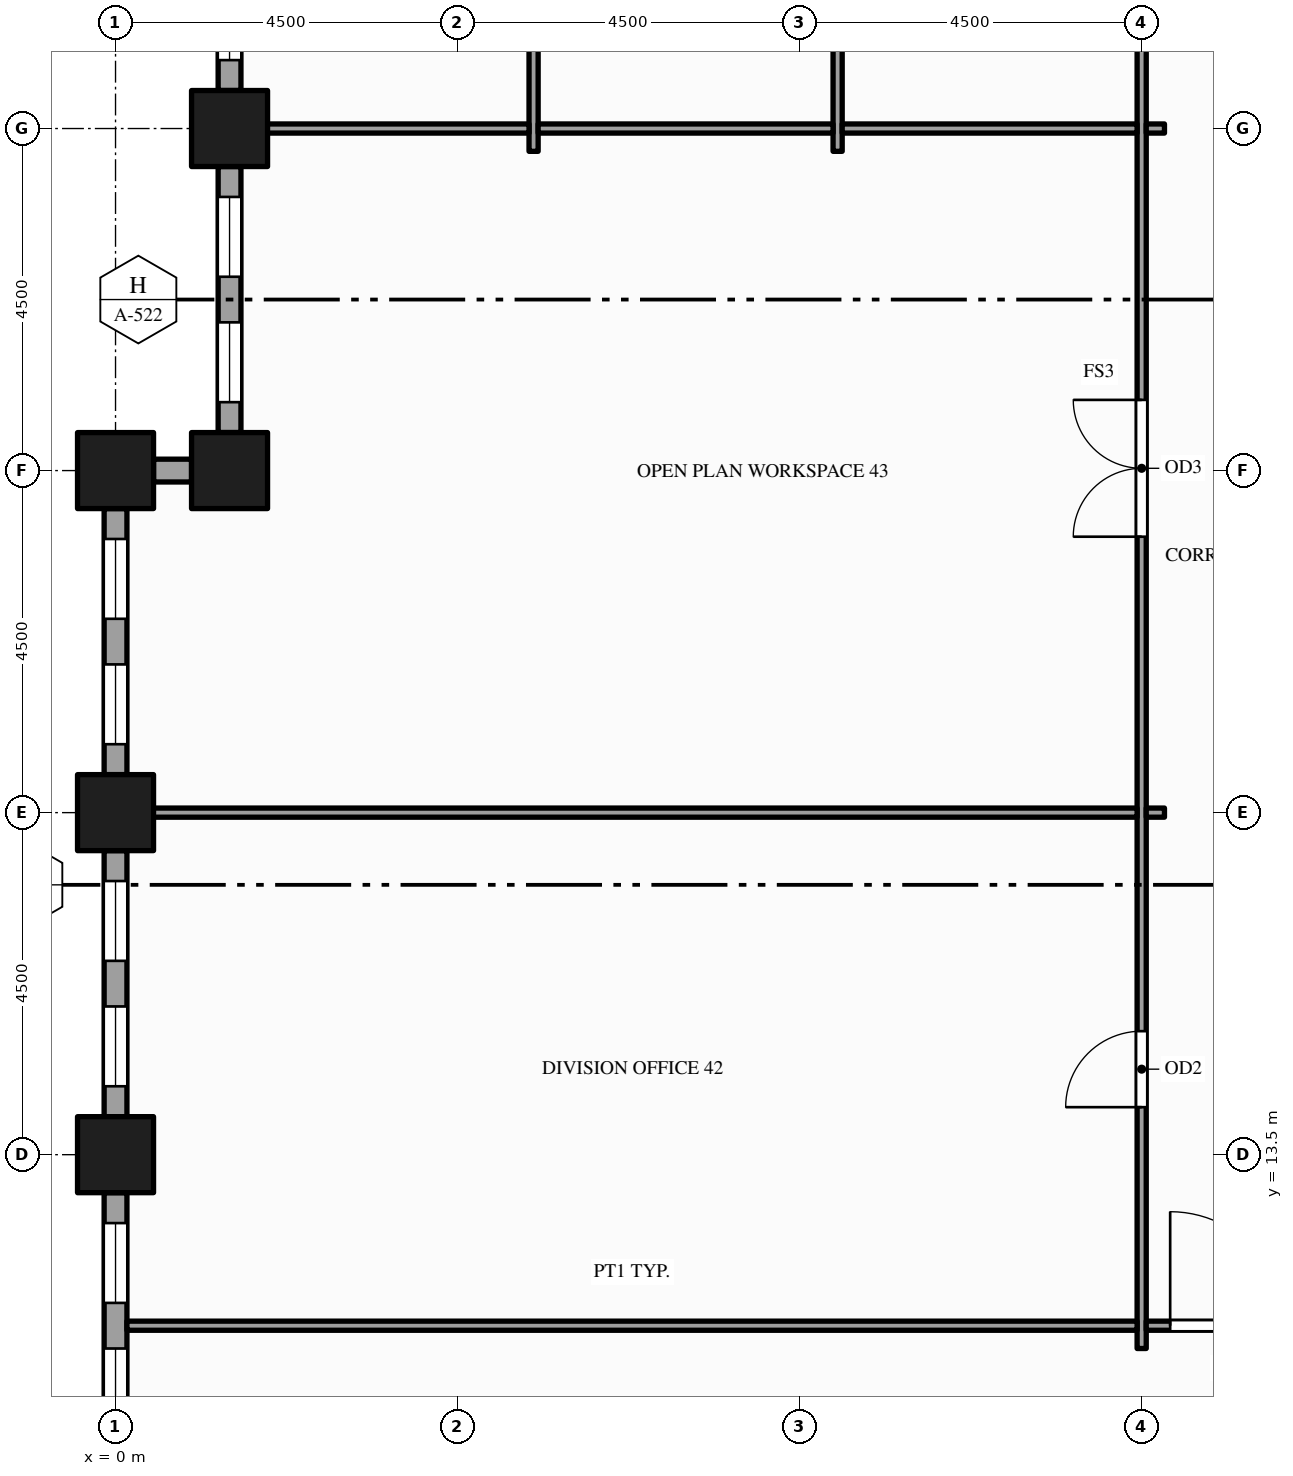
"""IFC4 building model, lengths in metres.
Left out: names, types, materials, properties, quantities, classifications, styles, units other than length and angle.
Written with IfcOpenShell. Run it as: python <this file> out.ifc"""

import sys

from ifc_helpers import new_model, si_unit, direction, frame, frame_2d, origin, origin_2d, place, context, subcontext, project, spatial, rectangle, hollow_rectangle, extrude, element, fill, save


model = new_model("IFC4")
c1 = context("Model", 3, precision=1e-05, world=origin(), true_north=direction((0.0, 1.0)))
c2 = subcontext(c1, "Body", "Model", "MODEL_VIEW")
j1 = project(units=[si_unit("LENGTHUNIT", "METRE"), si_unit("PLANEANGLEUNIT", "RADIAN")], contexts=[c1])
p1 = place(None, origin())
s1 = spatial("IfcSite", under=j1, at=p1, CompositionType="ELEMENT")
p2 = place(p1, origin())
s2 = spatial("IfcBuilding", under=s1, at=p2, CompositionType="ELEMENT")
p3 = place(p2, frame((0.0, 0.0, 115.0)))
s3 = spatial("IfcBuildingStorey", under=s2, at=p3, CompositionType="ELEMENT", Elevation=115.0)
for number, where, z_axis, x_axis in (
    (1, (0.0, 13.5, -0.15), (0.0, 0.0, 1.0), (1.0, 0.0, 0.0)),
    (2, (0.0, 18.0, -0.15), (0.0, 0.0, 1.0), (1.0, 0.0, 0.0)),
    (3, (0.0, 22.5, -0.15), (0.0, 0.0, 1.0), (1.0, 0.0, 0.0)),
    (4, (1.5, 22.5, -0.15), (0.0, 0.0, 1.0), (1.0, 0.0, 0.0)),
    (5, (1.5, 27.0, -0.15), (0.0, 0.0, 1.0), (1.0, 0.0, 0.0)),
):
    element("IfcColumn", number, at=place(p3, frame(where, z_axis=z_axis, x_axis=x_axis)), inside=s3, PredefinedType="COLUMN", context=c2, shape_type="SweptSolid", body=[
        extrude(hollow_rectangle(XDim=1.0, YDim=1.0, WallThickness=0.05, at=origin_2d()), origin(), (0.0, 0.0, 1.0), 4.0),
    ])
p4 = place(p3, frame((1.5, 31.0, 0.0), z_axis=(0.0, 0.0, 1.0), x_axis=(0.0, -1.0, 0.0)))
e6 = element("IfcWall", 6, at=p4, inside=s3, PredefinedType="STANDARD", context=c2, shape_type="SweptSolid", body=[
    extrude(rectangle(XDim=3.5, YDim=0.3, at=frame_2d((1.75, 0.0))), origin(), (0.0, 0.0, 1.0), 3.154),
])
p5 = place(p4, frame((0.4, 0.0, 0.9)))
e7 = element("IfcOpeningElement", 7, at=p5, cuts=e6, PredefinedType="OPENING", context=c2, shape_type="SweptSolid", body=[
    extrude(rectangle(XDim=1.05, YDim=2.0, at=frame_2d((0.525, 1.0))), frame((0.0, 0.16, 0.0), z_axis=(0.0, -1.0, 0.0), x_axis=(1.0, 0.0, 0.0)), (0.0, 0.0, 1.0), 0.32),
])
p6 = place(p4, frame((2.05, 0.0, 0.9)))
e8 = element("IfcOpeningElement", 8, at=p6, cuts=e6, PredefinedType="OPENING", context=c2, shape_type="SweptSolid", body=[
    extrude(rectangle(XDim=1.05, YDim=2.0, at=frame_2d((0.525, 1.0))), frame((0.0, 0.16, 0.0), z_axis=(0.0, -1.0, 0.0), x_axis=(1.0, 0.0, 0.0)), (0.0, 0.0, 1.0), 0.32),
])
p7 = place(p3, frame((1.5, 26.5, 0.0), z_axis=(0.0, 0.0, 1.0), x_axis=(0.0, -1.0, 0.0)))
e9 = element("IfcWall", 9, at=p7, inside=s3, PredefinedType="STANDARD", context=c2, shape_type="SweptSolid", body=[
    extrude(rectangle(XDim=3.5, YDim=0.3, at=frame_2d((1.75, 0.0))), origin(), (0.0, 0.0, 1.0), 3.154),
])
p8 = place(p7, frame((0.4, 0.0, 0.9)))
e10 = element("IfcOpeningElement", 10, at=p8, cuts=e9, PredefinedType="OPENING", context=c2, shape_type="SweptSolid", body=[
    extrude(rectangle(XDim=1.05, YDim=2.0, at=frame_2d((0.525, 1.0))), frame((0.0, 0.16, 0.0), z_axis=(0.0, -1.0, 0.0), x_axis=(1.0, 0.0, 0.0)), (0.0, 0.0, 1.0), 0.32),
])
p9 = place(p7, frame((2.05, 0.0, 0.9)))
e11 = element("IfcOpeningElement", 11, at=p9, cuts=e9, PredefinedType="OPENING", context=c2, shape_type="SweptSolid", body=[
    extrude(rectangle(XDim=1.05, YDim=2.0, at=frame_2d((0.525, 1.0))), frame((0.0, 0.16, 0.0), z_axis=(0.0, -1.0, 0.0), x_axis=(1.0, 0.0, 0.0)), (0.0, 0.0, 1.0), 0.32),
])
p10 = place(p3, frame((1.0, 22.5, 0.0), z_axis=(0.0, 0.0, 1.0), x_axis=(-1.0, 0.0, 0.0)))
e12 = element("IfcWall", 12, at=p10, inside=s3, PredefinedType="STANDARD", context=c2, shape_type="SweptSolid", body=[
    extrude(rectangle(XDim=0.5, YDim=0.3, at=frame_2d((0.25, 0.0))), origin(), (0.0, 0.0, 1.0), 3.154),
])
p11 = place(p3, frame((0.0, 22.0, 0.0), z_axis=(0.0, 0.0, 1.0), x_axis=(0.0, -1.0, 0.0)))
e13 = element("IfcWall", 13, at=p11, inside=s3, PredefinedType="STANDARD", context=c2, shape_type="SweptSolid", body=[
    extrude(rectangle(XDim=3.5, YDim=0.3, at=frame_2d((1.75, 0.0))), origin(), (0.0, 0.0, 1.0), 3.154),
])
p12 = place(p11, frame((0.4, 0.0, 0.9)))
e14 = element("IfcOpeningElement", 14, at=p12, cuts=e13, PredefinedType="OPENING", context=c2, shape_type="SweptSolid", body=[
    extrude(rectangle(XDim=1.05, YDim=2.0, at=frame_2d((0.525, 1.0))), frame((0.0, 0.16, 0.0), z_axis=(0.0, -1.0, 0.0), x_axis=(1.0, 0.0, 0.0)), (0.0, 0.0, 1.0), 0.32),
])
p13 = place(p11, frame((2.05, 0.0, 0.9)))
e15 = element("IfcOpeningElement", 15, at=p13, cuts=e13, PredefinedType="OPENING", context=c2, shape_type="SweptSolid", body=[
    extrude(rectangle(XDim=1.05, YDim=2.0, at=frame_2d((0.525, 1.0))), frame((0.0, 0.16, 0.0), z_axis=(0.0, -1.0, 0.0), x_axis=(1.0, 0.0, 0.0)), (0.0, 0.0, 1.0), 0.32),
])
p14 = place(p3, frame((0.0, 17.5, 0.0), z_axis=(0.0, 0.0, 1.0), x_axis=(0.0, -1.0, 0.0)))
e16 = element("IfcWall", 16, at=p14, inside=s3, PredefinedType="STANDARD", context=c2, shape_type="SweptSolid", body=[
    extrude(rectangle(XDim=3.5, YDim=0.3, at=frame_2d((1.75, 0.0))), origin(), (0.0, 0.0, 1.0), 3.154),
])
p15 = place(p14, frame((0.4, 0.0, 0.9)))
e17 = element("IfcOpeningElement", 17, at=p15, cuts=e16, PredefinedType="OPENING", context=c2, shape_type="SweptSolid", body=[
    extrude(rectangle(XDim=1.05, YDim=2.0, at=frame_2d((0.525, 1.0))), frame((0.0, 0.16, 0.0), z_axis=(0.0, -1.0, 0.0), x_axis=(1.0, 0.0, 0.0)), (0.0, 0.0, 1.0), 0.32),
])
p16 = place(p14, frame((2.05, 0.0, 0.9)))
e18 = element("IfcOpeningElement", 18, at=p16, cuts=e16, PredefinedType="OPENING", context=c2, shape_type="SweptSolid", body=[
    extrude(rectangle(XDim=1.05, YDim=2.0, at=frame_2d((0.525, 1.0))), frame((0.0, 0.16, 0.0), z_axis=(0.0, -1.0, 0.0), x_axis=(1.0, 0.0, 0.0)), (0.0, 0.0, 1.0), 0.32),
])
p17 = place(p3, frame((0.0, 13.0, 0.0), z_axis=(0.0, 0.0, 1.0), x_axis=(0.0, -1.0, 0.0)))
e19 = element("IfcWall", 19, at=p17, inside=s3, PredefinedType="STANDARD", context=c2, shape_type="SweptSolid", body=[
    extrude(rectangle(XDim=3.5, YDim=0.3, at=frame_2d((1.75, 0.0))), origin(), (0.0, 0.0, 1.0), 3.154),
])
p18 = place(p17, frame((0.4, 0.0, 0.9)))
e20 = element("IfcOpeningElement", 20, at=p18, cuts=e19, PredefinedType="OPENING", context=c2, shape_type="SweptSolid", body=[
    extrude(rectangle(XDim=1.05, YDim=2.0, at=frame_2d((0.525, 1.0))), frame((0.0, 0.16, 0.0), z_axis=(0.0, -1.0, 0.0), x_axis=(1.0, 0.0, 0.0)), (0.0, 0.0, 1.0), 0.32),
])
p19 = place(p17, frame((2.05, 0.0, 0.9)))
e21 = element("IfcOpeningElement", 21, at=p19, cuts=e19, PredefinedType="OPENING", context=c2, shape_type="SweptSolid", body=[
    extrude(rectangle(XDim=1.05, YDim=2.0, at=frame_2d((0.525, 1.0))), frame((0.0, 0.16, 0.0), z_axis=(0.0, -1.0, 0.0), x_axis=(1.0, 0.0, 0.0)), (0.0, 0.0, 1.0), 0.32),
])
for number, where, z_axis, x_axis in (
    (22, (5.5, 26.7, 0.0), (0.0, 0.0, 1.0), (0.0, 1.0, 0.0)),
    (23, (9.5, 26.7, 0.0), (0.0, 0.0, 1.0), (0.0, 1.0, 0.0)),
):
    element("IfcWall", number, at=place(p3, frame(where, z_axis=z_axis, x_axis=x_axis)), inside=s3, PredefinedType="PARTITIONING", context=c2, shape_type="SweptSolid", body=[
        extrude(rectangle(XDim=5.1, YDim=0.12, at=frame_2d((2.55, 0.0))), origin(), (0.0, 0.0, 1.0), 3.85),
    ])
p20 = place(p3, frame((13.5, 10.95, 0.0), z_axis=(0.0, 0.0, 1.0), x_axis=(0.0, 1.0, 0.0)))
e24 = element("IfcWall", 24, at=p20, inside=s3, PredefinedType="PARTITIONING", context=c2, shape_type="SweptSolid", body=[
    extrude(rectangle(XDim=20.85, YDim=0.12, at=frame_2d((10.425, 0.0))), origin(), (0.0, 0.0, 1.0), 2.6),
])
p21 = place(p20, frame((3.175, 0.0, 0.0)))
e25 = element("IfcOpeningElement", 25, at=p21, cuts=e24, PredefinedType="OPENING", context=c2, shape_type="SweptSolid", body=[
    extrude(rectangle(XDim=1.0, YDim=2.1, at=frame_2d((0.5, 1.05))), frame((0.0, 0.07, 0.0), z_axis=(0.0, -1.0, 0.0), x_axis=(1.0, 0.0, 0.0)), (0.0, 0.0, 1.0), 0.14),
])
p22 = place(p20, frame((10.68, 0.0, 0.0)))
e26 = element("IfcOpeningElement", 26, at=p22, cuts=e24, PredefinedType="OPENING", context=c2, shape_type="SweptSolid", body=[
    extrude(rectangle(XDim=1.8, YDim=2.1, at=frame_2d((0.9, 1.05))), frame((0.0, 0.07, 0.0), z_axis=(0.0, -1.0, 0.0), x_axis=(1.0, 0.0, 0.0)), (0.0, 0.0, 1.0), 0.14),
])
p23 = place(p3, frame((0.15, 11.25, 0.0), z_axis=(0.0, 0.0, 1.0), x_axis=(1.0, 0.0, 0.0)))
e27 = element("IfcWall", 27, at=p23, inside=s3, PredefinedType="PARTITIONING", context=c2, shape_type="SweptSolid", body=[
    extrude(rectangle(XDim=13.29, YDim=0.12, at=frame_2d((6.645, 0.0))), origin(), (0.0, 0.0, 1.0), 2.938),
])
p24 = place(p3, frame((13.56, 11.25, 0.0), z_axis=(0.0, 0.0, 1.0), x_axis=(1.0, 0.0, 0.0)))
e28 = element("IfcWall", 28, at=p24, inside=s3, PredefinedType="PARTITIONING", context=c2, shape_type="SweptSolid", body=[
    extrude(rectangle(XDim=2.13, YDim=0.12, at=frame_2d((1.065, 0.0))), origin(), (0.0, 0.0, 1.0), 2.938),
])
p25 = place(p24, frame((0.315, 0.0, 0.0)))
e29 = element("IfcOpeningElement", 29, at=p25, cuts=e28, PredefinedType="OPENING", context=c2, shape_type="SweptSolid", body=[
    extrude(rectangle(XDim=1.5, YDim=2.1, at=frame_2d((0.75, 1.05))), frame((0.0, 0.07, 0.0), z_axis=(0.0, -1.0, 0.0), x_axis=(1.0, 0.0, 0.0)), (0.0, 0.0, 1.0), 0.14),
])
p26 = place(p3, frame((0.15, 18.0, 0.0), z_axis=(0.0, 0.0, 1.0), x_axis=(1.0, 0.0, 0.0)))
e30 = element("IfcWall", 30, at=p26, inside=s3, PredefinedType="PARTITIONING", context=c2, shape_type="SweptSolid", body=[
    extrude(rectangle(XDim=13.29, YDim=0.12, at=frame_2d((6.645, 0.0))), origin(), (0.0, 0.0, 1.0), 2.938),
])
p27 = place(p3, frame((13.56, 18.0, 0.0), z_axis=(0.0, 0.0, 1.0), x_axis=(1.0, 0.0, 0.0)))
e31 = element("IfcWall", 31, at=p27, inside=s3, PredefinedType="PARTITIONING", context=c2, shape_type="SweptSolid", body=[
    extrude(rectangle(XDim=0.24, YDim=0.12, at=frame_2d((0.12, 0.0))), origin(), (0.0, 0.0, 1.0), 2.938),
])
p28 = place(p3, frame((1.65, 27.0, 0.0), z_axis=(0.0, 0.0, 1.0), x_axis=(1.0, 0.0, 0.0)))
e32 = element("IfcWall", 32, at=p28, inside=s3, PredefinedType="PARTITIONING", context=c2, shape_type="SweptSolid", body=[
    extrude(rectangle(XDim=3.79, YDim=0.12, at=frame_2d((1.895, 0.0))), origin(), (0.0, 0.0, 1.0), 2.938),
])
for number, where, z_axis, x_axis in (
    (33, (5.56, 27.0, 0.0), (0.0, 0.0, 1.0), (1.0, 0.0, 0.0)),
    (34, (9.56, 27.0, 0.0), (0.0, 0.0, 1.0), (1.0, 0.0, 0.0)),
):
    element("IfcWall", number, at=place(p3, frame(where, z_axis=z_axis, x_axis=x_axis)), inside=s3, PredefinedType="PARTITIONING", context=c2, shape_type="SweptSolid", body=[
        extrude(rectangle(XDim=3.88, YDim=0.12, at=frame_2d((1.94, 0.0))), origin(), (0.0, 0.0, 1.0), 2.938),
    ])
p29 = place(p3, frame((13.56, 27.0, 0.0), z_axis=(0.0, 0.0, 1.0), x_axis=(1.0, 0.0, 0.0)))
e35 = element("IfcWall", 35, at=p29, inside=s3, PredefinedType="PARTITIONING", context=c2, shape_type="SweptSolid", body=[
    extrude(rectangle(XDim=0.24, YDim=0.12, at=frame_2d((0.12, 0.0))), origin(), (0.0, 0.0, 1.0), 2.938),
])
p30 = place(p6, origin())
e36 = element("IfcWindow", 36, at=p30, inside=s3, PartitioningType="SINGLE_PANEL", PredefinedType="WINDOW", context=c2, shape_type="SweptSolid", body=[
    extrude(rectangle(XDim=1.05, YDim=2.0, at=frame_2d((0.525, 1.0))), frame((0.0, 0.03, 0.0), z_axis=(0.0, -1.0, 0.0), x_axis=(1.0, 0.0, 0.0)), (0.0, 0.0, 1.0), 0.06),
])
fill(e8, e36)
p31 = place(p8, origin())
e37 = element("IfcWindow", 37, at=p31, inside=s3, PartitioningType="SINGLE_PANEL", PredefinedType="WINDOW", context=c2, shape_type="SweptSolid", body=[
    extrude(rectangle(XDim=1.05, YDim=2.0, at=frame_2d((0.525, 1.0))), frame((0.0, 0.03, 0.0), z_axis=(0.0, -1.0, 0.0), x_axis=(1.0, 0.0, 0.0)), (0.0, 0.0, 1.0), 0.06),
])
fill(e10, e37)
p32 = place(p9, origin())
e38 = element("IfcWindow", 38, at=p32, inside=s3, PartitioningType="SINGLE_PANEL", PredefinedType="WINDOW", context=c2, shape_type="SweptSolid", body=[
    extrude(rectangle(XDim=1.05, YDim=2.0, at=frame_2d((0.525, 1.0))), frame((0.0, 0.03, 0.0), z_axis=(0.0, -1.0, 0.0), x_axis=(1.0, 0.0, 0.0)), (0.0, 0.0, 1.0), 0.06),
])
fill(e11, e38)
p33 = place(p12, origin())
e39 = element("IfcWindow", 39, at=p33, inside=s3, PartitioningType="SINGLE_PANEL", PredefinedType="WINDOW", context=c2, shape_type="SweptSolid", body=[
    extrude(rectangle(XDim=1.05, YDim=2.0, at=frame_2d((0.525, 1.0))), frame((0.0, 0.03, 0.0), z_axis=(0.0, -1.0, 0.0), x_axis=(1.0, 0.0, 0.0)), (0.0, 0.0, 1.0), 0.06),
])
fill(e14, e39)
p34 = place(p13, origin())
e40 = element("IfcWindow", 40, at=p34, inside=s3, PartitioningType="SINGLE_PANEL", PredefinedType="WINDOW", context=c2, shape_type="SweptSolid", body=[
    extrude(rectangle(XDim=1.05, YDim=2.0, at=frame_2d((0.525, 1.0))), frame((0.0, 0.03, 0.0), z_axis=(0.0, -1.0, 0.0), x_axis=(1.0, 0.0, 0.0)), (0.0, 0.0, 1.0), 0.06),
])
fill(e15, e40)
p35 = place(p15, origin())
e41 = element("IfcWindow", 41, at=p35, inside=s3, PartitioningType="SINGLE_PANEL", PredefinedType="WINDOW", context=c2, shape_type="SweptSolid", body=[
    extrude(rectangle(XDim=1.05, YDim=2.0, at=frame_2d((0.525, 1.0))), frame((0.0, 0.03, 0.0), z_axis=(0.0, -1.0, 0.0), x_axis=(1.0, 0.0, 0.0)), (0.0, 0.0, 1.0), 0.06),
])
fill(e17, e41)
p36 = place(p16, origin())
e42 = element("IfcWindow", 42, at=p36, inside=s3, PartitioningType="SINGLE_PANEL", PredefinedType="WINDOW", context=c2, shape_type="SweptSolid", body=[
    extrude(rectangle(XDim=1.05, YDim=2.0, at=frame_2d((0.525, 1.0))), frame((0.0, 0.03, 0.0), z_axis=(0.0, -1.0, 0.0), x_axis=(1.0, 0.0, 0.0)), (0.0, 0.0, 1.0), 0.06),
])
fill(e18, e42)
p37 = place(p18, origin())
e43 = element("IfcWindow", 43, at=p37, inside=s3, PartitioningType="SINGLE_PANEL", PredefinedType="WINDOW", context=c2, shape_type="SweptSolid", body=[
    extrude(rectangle(XDim=1.05, YDim=2.0, at=frame_2d((0.525, 1.0))), frame((0.0, 0.03, 0.0), z_axis=(0.0, -1.0, 0.0), x_axis=(1.0, 0.0, 0.0)), (0.0, 0.0, 1.0), 0.06),
])
fill(e20, e43)
p38 = place(p19, origin())
e44 = element("IfcWindow", 44, at=p38, inside=s3, PartitioningType="SINGLE_PANEL", PredefinedType="WINDOW", context=c2, shape_type="SweptSolid", body=[
    extrude(rectangle(XDim=1.05, YDim=2.0, at=frame_2d((0.525, 1.0))), frame((0.0, 0.03, 0.0), z_axis=(0.0, -1.0, 0.0), x_axis=(1.0, 0.0, 0.0)), (0.0, 0.0, 1.0), 0.06),
])
fill(e21, e44)
p39 = place(p25, origin())
e45 = element("IfcDoor", 45, at=p39, inside=s3, OperationType="SINGLE_SWING_LEFT", PredefinedType="DOOR", context=c2, shape_type="SweptSolid", body=[
    extrude(rectangle(XDim=1.5, YDim=2.1, at=frame_2d((0.75, 1.05))), frame((0.0, 0.025, 0.0), z_axis=(0.0, -1.0, 0.0), x_axis=(1.0, 0.0, 0.0)), (0.0, 0.0, 1.0), 0.05),
])
fill(e29, e45)
p40 = place(p21, origin())
e46 = element("IfcDoor", 46, at=p40, inside=s3, OperationType="SINGLE_SWING_LEFT", PredefinedType="DOOR", context=c2, shape_type="SweptSolid", body=[
    extrude(rectangle(XDim=1.0, YDim=2.1, at=frame_2d((0.5, 1.05))), frame((0.0, 0.025, 0.0), z_axis=(0.0, -1.0, 0.0), x_axis=(1.0, 0.0, 0.0)), (0.0, 0.0, 1.0), 0.05),
])
fill(e25, e46)
p41 = place(p22, origin())
e47 = element("IfcDoor", 47, at=p41, inside=s3, OperationType="DOUBLE_DOOR_SINGLE_SWING", PredefinedType="DOOR", context=c2, shape_type="SweptSolid", body=[
    extrude(rectangle(XDim=1.8, YDim=2.1, at=frame_2d((0.9, 1.05))), frame((0.0, 0.025, 0.0), z_axis=(0.0, -1.0, 0.0), x_axis=(1.0, 0.0, 0.0)), (0.0, 0.0, 1.0), 0.05),
])
fill(e26, e47)
save(model, sys.argv[1])
